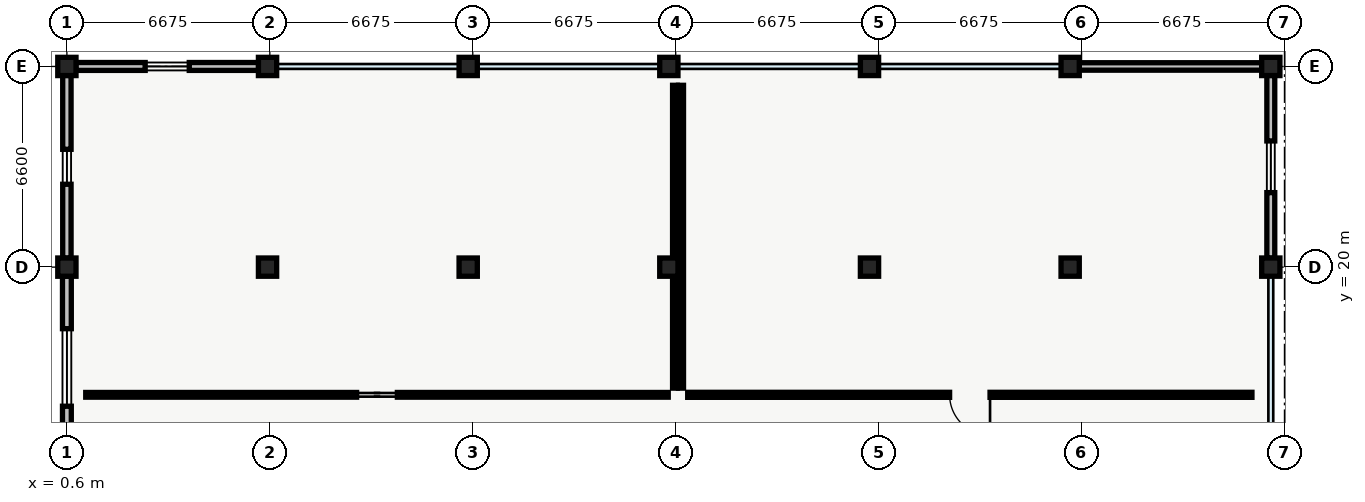
"""IFC4 building model, lengths in metres.
Left out: names, types, materials, properties, quantities, classifications, styles, units other than length and angle.
Written with IfcOpenShell. Run it as: python <this file> out.ifc"""

import sys

from ifc_helpers import new_model, si_unit, direction, frame, frame_2d, origin, origin_2d, place, context, subcontext, project, spatial, rectangle, extrude, element, fill, save


model = new_model("IFC4")
c1 = context("Model", 3, precision=1e-05, world=origin(), true_north=direction((0.0, 1.0)))
c2 = subcontext(c1, "Body", "Model", "MODEL_VIEW")
j1 = project(units=[si_unit("LENGTHUNIT", "METRE"), si_unit("PLANEANGLEUNIT", "RADIAN")], contexts=[c1])
p1 = place(None, origin())
s1 = spatial("IfcSite", under=j1, at=p1, CompositionType="ELEMENT")
p2 = place(p1, origin())
s2 = spatial("IfcBuilding", under=s1, at=p2, CompositionType="ELEMENT")
p3 = place(p2, frame((0.0, 0.0, 5.1)))
s3 = spatial("IfcBuildingStorey", under=s2, at=p3, CompositionType="ELEMENT", Elevation=5.1)
for number, where, z_axis, x_axis in (
    (1, (0.6, 20.0, 0.0), (0.0, 0.0, 1.0), (1.0, 0.0, 0.0)),
    (2, (0.6, 26.6, 0.0), (0.0, 0.0, 1.0), (1.0, 0.0, 0.0)),
    (3, (7.2, 20.0, 0.0), (0.0, 0.0, 1.0), (1.0, 0.0, 0.0)),
    (4, (7.2, 26.6, 0.0), (0.0, 0.0, 1.0), (1.0, 0.0, 0.0)),
    (5, (13.8, 20.0, 0.0), (0.0, 0.0, 1.0), (1.0, 0.0, 0.0)),
    (6, (13.8, 26.6, 0.0), (0.0, 0.0, 1.0), (1.0, 0.0, 0.0)),
    (7, (20.4, 20.0, 0.0), (0.0, 0.0, 1.0), (1.0, 0.0, 0.0)),
    (8, (20.4, 26.6, 0.0), (0.0, 0.0, 1.0), (1.0, 0.0, 0.0)),
    (9, (27.0, 20.0, 0.0), (0.0, 0.0, 1.0), (1.0, 0.0, 0.0)),
    (10, (27.0, 26.6, 0.0), (0.0, 0.0, 1.0), (1.0, 0.0, 0.0)),
    (11, (33.6, 20.0, 0.0), (0.0, 0.0, 1.0), (1.0, 0.0, 0.0)),
    (12, (33.6, 26.6, 0.0), (0.0, 0.0, 1.0), (1.0, 0.0, 0.0)),
    (13, (40.2, 20.0, 0.0), (0.0, 0.0, 1.0), (1.0, 0.0, 0.0)),
    (14, (40.2, 26.6, 0.0), (0.0, 0.0, 1.0), (1.0, 0.0, 0.0)),
):
    element("IfcColumn", number, at=place(p3, frame(where, z_axis=z_axis, x_axis=x_axis)), inside=s3, PredefinedType="COLUMN", context=c2, shape_type="SweptSolid", body=[
        extrude(rectangle(XDim=0.6, YDim=0.6, at=origin_2d()), origin(), (0.0, 0.0, 1.0), 4.3),
    ])
p4 = place(p3, frame((0.6, 13.695, 0.0), z_axis=(0.0, 0.0, 1.0), x_axis=(0.0, 1.0, 0.0)))
e15 = element("IfcWall", 15, at=p4, inside=s3, PredefinedType="STANDARD", context=c2, shape_type="SweptSolid", body=[
    extrude(rectangle(XDim=6.01, YDim=0.29, at=frame_2d((3.005, 0.0))), origin(), (0.0, 0.0, 1.0), 3.785),
])
p5 = place(p4, frame((1.73, 0.0, 0.95)))
e16 = element("IfcOpeningElement", 16, at=p5, cuts=e15, PredefinedType="OPENING", context=c2, shape_type="SweptSolid", body=[
    extrude(rectangle(XDim=2.55, YDim=1.75, at=frame_2d((1.275, 0.875))), frame((0.0, 0.145, 0.0), z_axis=(0.0, -1.0, 0.0), x_axis=(1.0, 0.0, 0.0)), (0.0, 0.0, 1.0), 0.29),
])
p6 = place(p3, frame((0.6, 20.295, 0.0), z_axis=(0.0, 0.0, 1.0), x_axis=(0.0, 1.0, 0.0)))
e17 = element("IfcWall", 17, at=p6, inside=s3, PredefinedType="STANDARD", context=c2, shape_type="SweptSolid", body=[
    extrude(rectangle(XDim=6.01, YDim=0.275, at=frame_2d((3.005, 0.0))), origin(), (0.0, 0.0, 1.0), 3.785),
])
p7 = place(p6, frame((2.43, 0.0, 0.95)))
e18 = element("IfcOpeningElement", 18, at=p7, cuts=e17, PredefinedType="OPENING", context=c2, shape_type="SweptSolid", body=[
    extrude(rectangle(XDim=1.15, YDim=1.6, at=frame_2d((0.575, 0.8))), frame((0.0, 0.137, 0.0), z_axis=(0.0, -1.0, 0.0), x_axis=(1.0, 0.0, 0.0)), (0.0, 0.0, 1.0), 0.275),
])
p8 = place(p3, frame((0.895, 26.6, 0.0), z_axis=(0.0, 0.0, 1.0), x_axis=(1.0, 0.0, 0.0)))
e19 = element("IfcWall", 19, at=p8, inside=s3, PredefinedType="STANDARD", context=c2, shape_type="SweptSolid", body=[
    extrude(rectangle(XDim=6.01, YDim=0.26, at=frame_2d((3.005, 0.0))), origin(), (0.0, 0.0, 1.0), 3.785),
])
p9 = place(p8, frame((2.28, 0.0, 0.95)))
e20 = element("IfcOpeningElement", 20, at=p9, cuts=e19, PredefinedType="OPENING", context=c2, shape_type="SweptSolid", body=[
    extrude(rectangle(XDim=1.45, YDim=1.35, at=frame_2d((0.725, 0.675))), frame((0.0, 0.13, 0.0), z_axis=(0.0, -1.0, 0.0), x_axis=(1.0, 0.0, 0.0)), (0.0, 0.0, 1.0), 0.26),
])
p10 = place(p3, frame((33.895, 26.6, 0.0), z_axis=(0.0, 0.0, 1.0), x_axis=(1.0, 0.0, 0.0)))
e21 = element("IfcWall", 21, at=p10, inside=s3, PredefinedType="STANDARD", context=c2, shape_type="SweptSolid", body=[
    extrude(rectangle(XDim=6.01, YDim=0.245, at=frame_2d((3.005, 0.0))), origin(), (0.0, 0.0, 1.0), 3.785),
])
p11 = place(p3, frame((40.2, 26.305, 0.0), z_axis=(0.0, 0.0, 1.0), x_axis=(0.0, -1.0, 0.0)))
e22 = element("IfcWall", 22, at=p11, inside=s3, PredefinedType="STANDARD", context=c2, shape_type="SweptSolid", body=[
    extrude(rectangle(XDim=6.01, YDim=0.26, at=frame_2d((3.005, 0.0))), origin(), (0.0, 0.0, 1.0), 3.785),
])
p12 = place(p11, frame((2.155, 0.0, 0.95)))
e23 = element("IfcOpeningElement", 23, at=p12, cuts=e22, PredefinedType="OPENING", context=c2, shape_type="SweptSolid", body=[
    extrude(rectangle(XDim=1.7, YDim=1.55, at=frame_2d((0.85, 0.775))), frame((0.0, 0.13, 0.0), z_axis=(0.0, -1.0, 0.0), x_axis=(1.0, 0.0, 0.0)), (0.0, 0.0, 1.0), 0.26),
])
p13 = place(p3, frame((1.22, 15.8, 0.0), z_axis=(0.0, 0.0, 1.0), x_axis=(1.0, 0.0, 0.0)))
e24 = element("IfcWall", 24, at=p13, inside=s3, PredefinedType="PARTITIONING", context=c2, shape_type="SweptSolid", body=[
    extrude(rectangle(XDim=19.16, YDim=0.155, at=frame_2d((9.58, 0.0))), origin(), (0.0, 0.0, 1.0), 3.95),
])
p14 = place(p13, frame((8.91, 0.0, 0.0)))
e25 = element("IfcOpeningElement", 25, at=p14, cuts=e24, PredefinedType="OPENING", context=c2, shape_type="SweptSolid", body=[
    extrude(rectangle(XDim=1.34, YDim=2.2, at=frame_2d((0.67, 1.1))), frame((0.0, 0.078, 0.0), z_axis=(0.0, -1.0, 0.0), x_axis=(1.0, 0.0, 0.0)), (0.0, 0.0, 1.0), 0.155),
])
p15 = place(p3, frame((20.6, 16.02, 0.0), z_axis=(0.0, 0.0, 1.0), x_axis=(0.0, 1.0, 0.0)))
e26 = element("IfcWall", 26, at=p15, inside=s3, PredefinedType="PARTITIONING", context=c2, shape_type="SweptSolid", body=[
    extrude(rectangle(XDim=9.96, YDim=0.155, at=frame_2d((4.98, 0.0))), origin(), (0.0, 0.0, 1.0), 3.635),
])
p16 = place(p3, frame((21.02, 15.8, 0.0), z_axis=(0.0, 0.0, 1.0), x_axis=(1.0, 0.0, 0.0)))
e27 = element("IfcWall", 27, at=p16, inside=s3, PredefinedType="PARTITIONING", context=c2, shape_type="SweptSolid", body=[
    extrude(rectangle(XDim=18.56, YDim=0.165, at=frame_2d((9.28, 0.0))), origin(), (0.0, 0.0, 1.0), 3.95),
])
p17 = place(p16, frame((8.615, 0.0, 0.0)))
e28 = element("IfcOpeningElement", 28, at=p17, cuts=e27, PredefinedType="OPENING", context=c2, shape_type="SweptSolid", body=[
    extrude(rectangle(XDim=1.33, YDim=2.12, at=frame_2d((0.665, 1.06))), frame((0.0, 0.083, 0.0), z_axis=(0.0, -1.0, 0.0), x_axis=(1.0, 0.0, 0.0)), (0.0, 0.0, 1.0), 0.165),
])
p18 = place(p3, frame((20.8, 25.98, 0.0), z_axis=(0.0, 0.0, 1.0), x_axis=(0.0, -1.0, 0.0)))
e29 = element("IfcWall", 29, at=p18, inside=s3, PredefinedType="PARTITIONING", context=c2, shape_type="SweptSolid", body=[
    extrude(rectangle(XDim=9.96, YDim=0.165, at=frame_2d((4.98, 0.0))), origin(), (0.0, 0.0, 1.0), 3.95),
])
p19 = place(p5, origin())
e30 = element("IfcWindow", 30, at=p19, inside=s3, PartitioningType="SINGLE_PANEL", PredefinedType="WINDOW", context=c2, shape_type="SweptSolid", body=[
    extrude(rectangle(XDim=2.55, YDim=1.75, at=frame_2d((1.275, 0.875))), frame((0.0, 0.03, 0.0), z_axis=(0.0, -1.0, 0.0), x_axis=(1.0, 0.0, 0.0)), (0.0, 0.0, 1.0), 0.06),
])
fill(e16, e30)
p20 = place(p7, origin())
e31 = element("IfcWindow", 31, at=p20, inside=s3, PartitioningType="SINGLE_PANEL", PredefinedType="WINDOW", context=c2, shape_type="SweptSolid", body=[
    extrude(rectangle(XDim=1.15, YDim=1.6, at=frame_2d((0.575, 0.8))), frame((0.0, 0.03, 0.0), z_axis=(0.0, -1.0, 0.0), x_axis=(1.0, 0.0, 0.0)), (0.0, 0.0, 1.0), 0.06),
])
fill(e18, e31)
p21 = place(p9, origin())
e32 = element("IfcWindow", 32, at=p21, inside=s3, PartitioningType="SINGLE_PANEL", PredefinedType="WINDOW", context=c2, shape_type="SweptSolid", body=[
    extrude(rectangle(XDim=1.45, YDim=1.35, at=frame_2d((0.725, 0.675))), frame((0.0, 0.03, 0.0), z_axis=(0.0, -1.0, 0.0), x_axis=(1.0, 0.0, 0.0)), (0.0, 0.0, 1.0), 0.06),
])
fill(e20, e32)
p22 = place(p12, origin())
e33 = element("IfcWindow", 33, at=p22, inside=s3, PartitioningType="SINGLE_PANEL", PredefinedType="WINDOW", context=c2, shape_type="SweptSolid", body=[
    extrude(rectangle(XDim=1.7, YDim=1.55, at=frame_2d((0.85, 0.775))), frame((0.0, 0.03, 0.0), z_axis=(0.0, -1.0, 0.0), x_axis=(1.0, 0.0, 0.0)), (0.0, 0.0, 1.0), 0.06),
])
fill(e23, e33)
p23 = place(p14, origin())
e34 = element("IfcDoor", 34, at=p23, inside=s3, OperationType="SLIDING_TO_RIGHT", PredefinedType="DOOR", context=c2, shape_type="SweptSolid", body=[
    extrude(rectangle(XDim=1.34, YDim=2.2, at=frame_2d((0.67, 1.1))), frame((0.0, 0.025, 0.0), z_axis=(0.0, -1.0, 0.0), x_axis=(1.0, 0.0, 0.0)), (0.0, 0.0, 1.0), 0.05),
])
fill(e25, e34)
p24 = place(p17, origin())
e35 = element("IfcDoor", 35, at=p24, inside=s3, OperationType="SINGLE_SWING_RIGHT", PredefinedType="DOOR", context=c2, shape_type="SweptSolid", body=[
    extrude(rectangle(XDim=1.33, YDim=2.12, at=frame_2d((0.665, 1.06))), frame((0.0, 0.025, 0.0), z_axis=(0.0, -1.0, 0.0), x_axis=(1.0, 0.0, 0.0)), (0.0, 0.0, 1.0), 0.05),
])
fill(e28, e35)
save(model, sys.argv[1])
